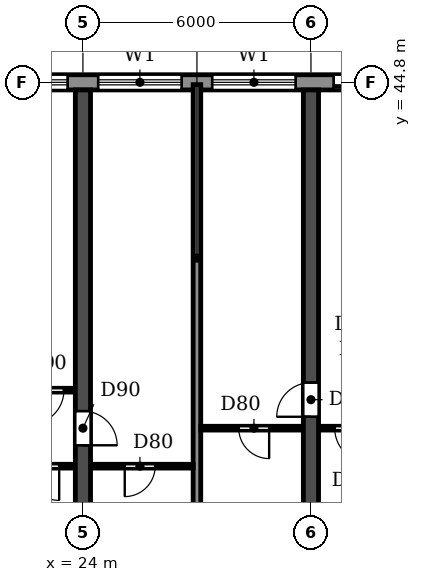
"""IFC4 building model, lengths in metres.
Left out: names, types, materials, properties, quantities, classifications, styles, units other than length and angle.
Written with IfcOpenShell. Run it as: python <this file> out.ifc"""

import sys

from ifc_helpers import new_model, si_unit, direction, frame, frame_2d, origin, place, context, subcontext, project, spatial, rectangle, extrude, element, fill, save


model = new_model("IFC4")
c1 = context("Model", 3, precision=1e-05, world=origin(), true_north=direction((0.0, 1.0)))
c2 = subcontext(c1, "Body", "Model", "MODEL_VIEW")
j1 = project(units=[si_unit("LENGTHUNIT", "METRE"), si_unit("PLANEANGLEUNIT", "RADIAN")], contexts=[c1])
p1 = place(None, origin())
s1 = spatial("IfcSite", under=j1, at=p1, CompositionType="ELEMENT")
p2 = place(p1, origin())
s2 = spatial("IfcBuilding", under=s1, at=p2, CompositionType="ELEMENT")
p3 = place(p2, frame((0.0, 0.0, 23.4)))
s3 = spatial("IfcBuildingStorey", under=s2, at=p3, CompositionType="ELEMENT", Elevation=23.4)
p4 = place(p3, frame((24.0, 30.55, 0.0), z_axis=(0.0, 0.0, 1.0), x_axis=(0.0, 1.0, 0.0)))
e1 = element("IfcWall", 1, at=p4, inside=s3, PredefinedType="SHEAR", context=c2, shape_type="SweptSolid", body=[
    extrude(rectangle(XDim=14.05, YDim=0.4, at=frame_2d((7.025, 0.0))), origin(), (0.0, 0.0, 1.0), 3.05),
])
p5 = place(p4, frame((4.7, 0.0, 0.0)))
e2 = element("IfcOpeningElement", 2, at=p5, cuts=e1, PredefinedType="OPENING", context=c2, shape_type="SweptSolid", body=[
    extrude(rectangle(XDim=0.9, YDim=2.1, at=frame_2d((0.45, 1.05))), frame((0.0, 0.21, 0.0), z_axis=(0.0, -1.0, 0.0), x_axis=(1.0, 0.0, 0.0)), (0.0, 0.0, 1.0), 0.42),
])
p6 = place(p3, frame((30.0, 30.55, 0.0), z_axis=(0.0, 0.0, 1.0), x_axis=(0.0, 1.0, 0.0)))
e3 = element("IfcWall", 3, at=p6, inside=s3, PredefinedType="SHEAR", context=c2, shape_type="SweptSolid", body=[
    extrude(rectangle(XDim=14.05, YDim=0.4, at=frame_2d((7.025, 0.0))), origin(), (0.0, 0.0, 1.0), 3.05),
])
p7 = place(p6, frame((5.45, 0.0, 0.0)))
e4 = element("IfcOpeningElement", 4, at=p7, cuts=e3, PredefinedType="OPENING", context=c2, shape_type="SweptSolid", body=[
    extrude(rectangle(XDim=0.9, YDim=2.1, at=frame_2d((0.45, 1.05))), frame((0.0, 0.21, 0.0), z_axis=(0.0, -1.0, 0.0), x_axis=(1.0, 0.0, 0.0)), (0.0, 0.0, 1.0), 0.42),
])
p8 = place(p3, frame((97.317, 44.8, 0.0), z_axis=(0.0, 0.0, 1.0), x_axis=(-1.0, 0.0, 0.0)))
e5 = element("IfcWall", 5, at=p8, inside=s3, PredefinedType="STANDARD", context=c2, shape_type="SweptSolid", body=[
    extrude(rectangle(XDim=92.634, YDim=0.4, at=frame_2d((46.317, 0.0))), origin(), (0.0, 0.0, 1.0), 3.05),
])
p9 = place(p8, frame((88.717, 0.0, 0.9)))
e6 = element("IfcOpeningElement", 6, at=p9, cuts=e5, PredefinedType="OPENING", context=c2, shape_type="SweptSolid", body=[
    extrude(rectangle(XDim=2.2, YDim=1.5, at=frame_2d((1.1, 0.75))), frame((0.0, 0.21, 0.0), z_axis=(0.0, -1.0, 0.0), x_axis=(1.0, 0.0, 0.0)), (0.0, 0.0, 1.0), 0.42),
])
p10 = place(p8, frame((85.917, 0.0, 0.0)))
e7 = element("IfcOpeningElement", 7, at=p10, cuts=e5, PredefinedType="OPENING", context=c2, shape_type="SweptSolid", body=[
    extrude(rectangle(XDim=1.8, YDim=2.4, at=frame_2d((0.9, 1.2))), frame((0.0, 0.21, 0.0), z_axis=(0.0, -1.0, 0.0), x_axis=(1.0, 0.0, 0.0)), (0.0, 0.0, 1.0), 0.42),
])
p11 = place(p8, frame((82.717, 0.0, 0.9)))
e8 = element("IfcOpeningElement", 8, at=p11, cuts=e5, PredefinedType="OPENING", context=c2, shape_type="SweptSolid", body=[
    extrude(rectangle(XDim=2.2, YDim=1.5, at=frame_2d((1.1, 0.75))), frame((0.0, 0.21, 0.0), z_axis=(0.0, -1.0, 0.0), x_axis=(1.0, 0.0, 0.0)), (0.0, 0.0, 1.0), 0.42),
])
p12 = place(p8, frame((79.717, 0.0, 0.9)))
e9 = element("IfcOpeningElement", 9, at=p12, cuts=e5, PredefinedType="OPENING", context=c2, shape_type="SweptSolid", body=[
    extrude(rectangle(XDim=2.2, YDim=1.5, at=frame_2d((1.1, 0.75))), frame((0.0, 0.21, 0.0), z_axis=(0.0, -1.0, 0.0), x_axis=(1.0, 0.0, 0.0)), (0.0, 0.0, 1.0), 0.42),
])
p13 = place(p8, frame((76.917, 0.0, 0.0)))
e10 = element("IfcOpeningElement", 10, at=p13, cuts=e5, PredefinedType="OPENING", context=c2, shape_type="SweptSolid", body=[
    extrude(rectangle(XDim=1.8, YDim=2.4, at=frame_2d((0.9, 1.2))), frame((0.0, 0.21, 0.0), z_axis=(0.0, -1.0, 0.0), x_axis=(1.0, 0.0, 0.0)), (0.0, 0.0, 1.0), 0.42),
])
p14 = place(p8, frame((73.717, 0.0, 0.9)))
e11 = element("IfcOpeningElement", 11, at=p14, cuts=e5, PredefinedType="OPENING", context=c2, shape_type="SweptSolid", body=[
    extrude(rectangle(XDim=2.2, YDim=1.5, at=frame_2d((1.1, 0.75))), frame((0.0, 0.21, 0.0), z_axis=(0.0, -1.0, 0.0), x_axis=(1.0, 0.0, 0.0)), (0.0, 0.0, 1.0), 0.42),
])
p15 = place(p8, frame((70.717, 0.0, 0.9)))
e12 = element("IfcOpeningElement", 12, at=p15, cuts=e5, PredefinedType="OPENING", context=c2, shape_type="SweptSolid", body=[
    extrude(rectangle(XDim=2.2, YDim=1.5, at=frame_2d((1.1, 0.75))), frame((0.0, 0.21, 0.0), z_axis=(0.0, -1.0, 0.0), x_axis=(1.0, 0.0, 0.0)), (0.0, 0.0, 1.0), 0.42),
])
p16 = place(p8, frame((67.717, 0.0, 0.9)))
e13 = element("IfcOpeningElement", 13, at=p16, cuts=e5, PredefinedType="OPENING", context=c2, shape_type="SweptSolid", body=[
    extrude(rectangle(XDim=2.2, YDim=1.5, at=frame_2d((1.1, 0.75))), frame((0.0, 0.21, 0.0), z_axis=(0.0, -1.0, 0.0), x_axis=(1.0, 0.0, 0.0)), (0.0, 0.0, 1.0), 0.42),
])
p17 = place(p8, frame((64.917, 0.0, 0.0)))
e14 = element("IfcOpeningElement", 14, at=p17, cuts=e5, PredefinedType="OPENING", context=c2, shape_type="SweptSolid", body=[
    extrude(rectangle(XDim=1.8, YDim=2.4, at=frame_2d((0.9, 1.2))), frame((0.0, 0.21, 0.0), z_axis=(0.0, -1.0, 0.0), x_axis=(1.0, 0.0, 0.0)), (0.0, 0.0, 1.0), 0.42),
])
p18 = place(p8, frame((61.717, 0.0, 0.9)))
e15 = element("IfcOpeningElement", 15, at=p18, cuts=e5, PredefinedType="OPENING", context=c2, shape_type="SweptSolid", body=[
    extrude(rectangle(XDim=2.2, YDim=1.5, at=frame_2d((1.1, 0.75))), frame((0.0, 0.21, 0.0), z_axis=(0.0, -1.0, 0.0), x_axis=(1.0, 0.0, 0.0)), (0.0, 0.0, 1.0), 0.42),
])
p19 = place(p8, frame((58.717, 0.0, 0.9)))
e16 = element("IfcOpeningElement", 16, at=p19, cuts=e5, PredefinedType="OPENING", context=c2, shape_type="SweptSolid", body=[
    extrude(rectangle(XDim=2.2, YDim=1.5, at=frame_2d((1.1, 0.75))), frame((0.0, 0.21, 0.0), z_axis=(0.0, -1.0, 0.0), x_axis=(1.0, 0.0, 0.0)), (0.0, 0.0, 1.0), 0.42),
])
p20 = place(p8, frame((55.917, 0.0, 0.0)))
e17 = element("IfcOpeningElement", 17, at=p20, cuts=e5, PredefinedType="OPENING", context=c2, shape_type="SweptSolid", body=[
    extrude(rectangle(XDim=1.8, YDim=2.4, at=frame_2d((0.9, 1.2))), frame((0.0, 0.21, 0.0), z_axis=(0.0, -1.0, 0.0), x_axis=(1.0, 0.0, 0.0)), (0.0, 0.0, 1.0), 0.42),
])
p21 = place(p8, frame((52.917, 0.0, 0.0)))
e18 = element("IfcOpeningElement", 18, at=p21, cuts=e5, PredefinedType="OPENING", context=c2, shape_type="SweptSolid", body=[
    extrude(rectangle(XDim=1.8, YDim=2.4, at=frame_2d((0.9, 1.2))), frame((0.0, 0.21, 0.0), z_axis=(0.0, -1.0, 0.0), x_axis=(1.0, 0.0, 0.0)), (0.0, 0.0, 1.0), 0.42),
])
p22 = place(p8, frame((49.717, 0.0, 0.9)))
e19 = element("IfcOpeningElement", 19, at=p22, cuts=e5, PredefinedType="OPENING", context=c2, shape_type="SweptSolid", body=[
    extrude(rectangle(XDim=2.2, YDim=1.5, at=frame_2d((1.1, 0.75))), frame((0.0, 0.21, 0.0), z_axis=(0.0, -1.0, 0.0), x_axis=(1.0, 0.0, 0.0)), (0.0, 0.0, 1.0), 0.42),
])
p23 = place(p8, frame((46.917, 0.0, 0.0)))
e20 = element("IfcOpeningElement", 20, at=p23, cuts=e5, PredefinedType="OPENING", context=c2, shape_type="SweptSolid", body=[
    extrude(rectangle(XDim=1.8, YDim=2.4, at=frame_2d((0.9, 1.2))), frame((0.0, 0.21, 0.0), z_axis=(0.0, -1.0, 0.0), x_axis=(1.0, 0.0, 0.0)), (0.0, 0.0, 1.0), 0.42),
])
p24 = place(p8, frame((43.717, 0.0, 0.9)))
e21 = element("IfcOpeningElement", 21, at=p24, cuts=e5, PredefinedType="OPENING", context=c2, shape_type="SweptSolid", body=[
    extrude(rectangle(XDim=2.2, YDim=1.5, at=frame_2d((1.1, 0.75))), frame((0.0, 0.21, 0.0), z_axis=(0.0, -1.0, 0.0), x_axis=(1.0, 0.0, 0.0)), (0.0, 0.0, 1.0), 0.42),
])
p25 = place(p8, frame((40.717, 0.0, 0.9)))
e22 = element("IfcOpeningElement", 22, at=p25, cuts=e5, PredefinedType="OPENING", context=c2, shape_type="SweptSolid", body=[
    extrude(rectangle(XDim=2.2, YDim=1.5, at=frame_2d((1.1, 0.75))), frame((0.0, 0.21, 0.0), z_axis=(0.0, -1.0, 0.0), x_axis=(1.0, 0.0, 0.0)), (0.0, 0.0, 1.0), 0.42),
])
p26 = place(p8, frame((37.917, 0.0, 0.0)))
e23 = element("IfcOpeningElement", 23, at=p26, cuts=e5, PredefinedType="OPENING", context=c2, shape_type="SweptSolid", body=[
    extrude(rectangle(XDim=1.8, YDim=2.4, at=frame_2d((0.9, 1.2))), frame((0.0, 0.21, 0.0), z_axis=(0.0, -1.0, 0.0), x_axis=(1.0, 0.0, 0.0)), (0.0, 0.0, 1.0), 0.42),
])
p27 = place(p8, frame((34.917, 0.0, 0.0)))
e24 = element("IfcOpeningElement", 24, at=p27, cuts=e5, PredefinedType="OPENING", context=c2, shape_type="SweptSolid", body=[
    extrude(rectangle(XDim=1.8, YDim=2.4, at=frame_2d((0.9, 1.2))), frame((0.0, 0.21, 0.0), z_axis=(0.0, -1.0, 0.0), x_axis=(1.0, 0.0, 0.0)), (0.0, 0.0, 1.0), 0.42),
])
p28 = place(p8, frame((31.717, 0.0, 0.9)))
e25 = element("IfcOpeningElement", 25, at=p28, cuts=e5, PredefinedType="OPENING", context=c2, shape_type="SweptSolid", body=[
    extrude(rectangle(XDim=2.2, YDim=1.5, at=frame_2d((1.1, 0.75))), frame((0.0, 0.21, 0.0), z_axis=(0.0, -1.0, 0.0), x_axis=(1.0, 0.0, 0.0)), (0.0, 0.0, 1.0), 0.42),
])
p29 = place(p8, frame((28.717, 0.0, 0.9)))
e26 = element("IfcOpeningElement", 26, at=p29, cuts=e5, PredefinedType="OPENING", context=c2, shape_type="SweptSolid", body=[
    extrude(rectangle(XDim=2.2, YDim=1.5, at=frame_2d((1.1, 0.75))), frame((0.0, 0.21, 0.0), z_axis=(0.0, -1.0, 0.0), x_axis=(1.0, 0.0, 0.0)), (0.0, 0.0, 1.0), 0.42),
])
p30 = place(p8, frame((25.717, 0.0, 0.9)))
e27 = element("IfcOpeningElement", 27, at=p30, cuts=e5, PredefinedType="OPENING", context=c2, shape_type="SweptSolid", body=[
    extrude(rectangle(XDim=2.2, YDim=1.5, at=frame_2d((1.1, 0.75))), frame((0.0, 0.21, 0.0), z_axis=(0.0, -1.0, 0.0), x_axis=(1.0, 0.0, 0.0)), (0.0, 0.0, 1.0), 0.42),
])
p31 = place(p8, frame((22.717, 0.0, 0.9)))
e28 = element("IfcOpeningElement", 28, at=p31, cuts=e5, PredefinedType="OPENING", context=c2, shape_type="SweptSolid", body=[
    extrude(rectangle(XDim=2.2, YDim=1.5, at=frame_2d((1.1, 0.75))), frame((0.0, 0.21, 0.0), z_axis=(0.0, -1.0, 0.0), x_axis=(1.0, 0.0, 0.0)), (0.0, 0.0, 1.0), 0.42),
])
p32 = place(p8, frame((19.917, 0.0, 0.0)))
e29 = element("IfcOpeningElement", 29, at=p32, cuts=e5, PredefinedType="OPENING", context=c2, shape_type="SweptSolid", body=[
    extrude(rectangle(XDim=1.8, YDim=2.4, at=frame_2d((0.9, 1.2))), frame((0.0, 0.21, 0.0), z_axis=(0.0, -1.0, 0.0), x_axis=(1.0, 0.0, 0.0)), (0.0, 0.0, 1.0), 0.42),
])
p33 = place(p8, frame((16.717, 0.0, 0.9)))
e30 = element("IfcOpeningElement", 30, at=p33, cuts=e5, PredefinedType="OPENING", context=c2, shape_type="SweptSolid", body=[
    extrude(rectangle(XDim=2.2, YDim=1.5, at=frame_2d((1.1, 0.75))), frame((0.0, 0.21, 0.0), z_axis=(0.0, -1.0, 0.0), x_axis=(1.0, 0.0, 0.0)), (0.0, 0.0, 1.0), 0.42),
])
p34 = place(p8, frame((13.717, 0.0, 0.9)))
e31 = element("IfcOpeningElement", 31, at=p34, cuts=e5, PredefinedType="OPENING", context=c2, shape_type="SweptSolid", body=[
    extrude(rectangle(XDim=2.2, YDim=1.5, at=frame_2d((1.1, 0.75))), frame((0.0, 0.21, 0.0), z_axis=(0.0, -1.0, 0.0), x_axis=(1.0, 0.0, 0.0)), (0.0, 0.0, 1.0), 0.42),
])
p35 = place(p8, frame((10.717, 0.0, 0.9)))
e32 = element("IfcOpeningElement", 32, at=p35, cuts=e5, PredefinedType="OPENING", context=c2, shape_type="SweptSolid", body=[
    extrude(rectangle(XDim=2.2, YDim=1.5, at=frame_2d((1.1, 0.75))), frame((0.0, 0.21, 0.0), z_axis=(0.0, -1.0, 0.0), x_axis=(1.0, 0.0, 0.0)), (0.0, 0.0, 1.0), 0.42),
])
p36 = place(p8, frame((7.917, 0.0, 0.0)))
e33 = element("IfcOpeningElement", 33, at=p36, cuts=e5, PredefinedType="OPENING", context=c2, shape_type="SweptSolid", body=[
    extrude(rectangle(XDim=1.8, YDim=2.4, at=frame_2d((0.9, 1.2))), frame((0.0, 0.21, 0.0), z_axis=(0.0, -1.0, 0.0), x_axis=(1.0, 0.0, 0.0)), (0.0, 0.0, 1.0), 0.42),
])
p37 = place(p8, frame((4.917, 0.0, 0.0)))
e34 = element("IfcOpeningElement", 34, at=p37, cuts=e5, PredefinedType="OPENING", context=c2, shape_type="SweptSolid", body=[
    extrude(rectangle(XDim=1.8, YDim=2.4, at=frame_2d((0.9, 1.2))), frame((0.0, 0.21, 0.0), z_axis=(0.0, -1.0, 0.0), x_axis=(1.0, 0.0, 0.0)), (0.0, 0.0, 1.0), 0.42),
])
p38 = place(p8, frame((1.717, 0.0, 0.9)))
e35 = element("IfcOpeningElement", 35, at=p38, cuts=e5, PredefinedType="OPENING", context=c2, shape_type="SweptSolid", body=[
    extrude(rectangle(XDim=2.2, YDim=1.5, at=frame_2d((1.1, 0.75))), frame((0.0, 0.21, 0.0), z_axis=(0.0, -1.0, 0.0), x_axis=(1.0, 0.0, 0.0)), (0.0, 0.0, 1.0), 0.42),
])
p39 = place(p3, frame((27.0, 30.56, 0.0), z_axis=(0.0, 0.0, 1.0), x_axis=(0.0, 1.0, 0.0)))
e36 = element("IfcWall", 36, at=p39, inside=s3, PredefinedType="PARTITIONING", context=c2, shape_type="SweptSolid", body=[
    extrude(rectangle(XDim=14.18, YDim=0.2, at=frame_2d((7.09, 0.0))), origin(), (0.0, 0.0, 1.0), 3.05),
])
p40 = place(p3, frame((21.8, 34.7, 0.0), z_axis=(0.0, 0.0, 1.0), x_axis=(1.0, 0.0, 0.0)))
e37 = element("IfcWall", 37, at=p40, inside=s3, PredefinedType="PARTITIONING", context=c2, shape_type="SweptSolid", body=[
    extrude(rectangle(XDim=1.99, YDim=0.1, at=frame_2d((0.995, 0.0))), origin(), (0.0, 0.0, 1.0), 3.05),
])
p41 = place(p40, frame((0.675, 0.0, 0.0)))
e38 = element("IfcOpeningElement", 38, at=p41, cuts=e37, PredefinedType="OPENING", context=c2, shape_type="SweptSolid", body=[
    extrude(rectangle(XDim=0.9, YDim=2.1, at=frame_2d((0.45, 1.05))), frame((0.0, 0.06, 0.0), z_axis=(0.0, -1.0, 0.0), x_axis=(1.0, 0.0, 0.0)), (0.0, 0.0, 1.0), 0.12),
])
p42 = place(p3, frame((24.21, 34.7, 0.0), z_axis=(0.0, 0.0, 1.0), x_axis=(1.0, 0.0, 0.0)))
e39 = element("IfcWall", 39, at=p42, inside=s3, PredefinedType="PARTITIONING", context=c2, shape_type="SweptSolid", body=[
    extrude(rectangle(XDim=2.69, YDim=0.1, at=frame_2d((1.345, 0.0))), origin(), (0.0, 0.0, 1.0), 3.05),
])
p43 = place(p42, frame((0.89, 0.0, 0.0)))
e40 = element("IfcOpeningElement", 40, at=p43, cuts=e39, PredefinedType="OPENING", context=c2, shape_type="SweptSolid", body=[
    extrude(rectangle(XDim=0.8, YDim=2.1, at=frame_2d((0.4, 1.05))), frame((0.0, 0.06, 0.0), z_axis=(0.0, -1.0, 0.0), x_axis=(1.0, 0.0, 0.0)), (0.0, 0.0, 1.0), 0.12),
])
p44 = place(p3, frame((27.1, 35.7, 0.0), z_axis=(0.0, 0.0, 1.0), x_axis=(1.0, 0.0, 0.0)))
e41 = element("IfcWall", 41, at=p44, inside=s3, PredefinedType="PARTITIONING", context=c2, shape_type="SweptSolid", body=[
    extrude(rectangle(XDim=2.69, YDim=0.1, at=frame_2d((1.345, 0.0))), origin(), (0.0, 0.0, 1.0), 3.05),
])
p45 = place(p44, frame((1.0, 0.0, 0.0)))
e42 = element("IfcOpeningElement", 42, at=p45, cuts=e41, PredefinedType="OPENING", context=c2, shape_type="SweptSolid", body=[
    extrude(rectangle(XDim=0.8, YDim=2.1, at=frame_2d((0.4, 1.05))), frame((0.0, 0.06, 0.0), z_axis=(0.0, -1.0, 0.0), x_axis=(1.0, 0.0, 0.0)), (0.0, 0.0, 1.0), 0.12),
])
p46 = place(p3, frame((30.21, 35.7, 0.0), z_axis=(0.0, 0.0, 1.0), x_axis=(1.0, 0.0, 0.0)))
e43 = element("IfcWall", 43, at=p46, inside=s3, PredefinedType="PARTITIONING", context=c2, shape_type="SweptSolid", body=[
    extrude(rectangle(XDim=1.99, YDim=0.1, at=frame_2d((0.995, 0.0))), origin(), (0.0, 0.0, 1.0), 3.05),
])
p47 = place(p46, frame((0.415, 0.0, 0.0)))
e44 = element("IfcOpeningElement", 44, at=p47, cuts=e43, PredefinedType="OPENING", context=c2, shape_type="SweptSolid", body=[
    extrude(rectangle(XDim=0.9, YDim=2.1, at=frame_2d((0.45, 1.05))), frame((0.0, 0.06, 0.0), z_axis=(0.0, -1.0, 0.0), x_axis=(1.0, 0.0, 0.0)), (0.0, 0.0, 1.0), 0.12),
])
p48 = place(p3, frame((20.95, 36.7, 0.0), z_axis=(0.0, 0.0, 1.0), x_axis=(1.0, 0.0, 0.0)))
e45 = element("IfcWall", 45, at=p48, inside=s3, PredefinedType="PARTITIONING", context=c2, shape_type="SweptSolid", body=[
    extrude(rectangle(XDim=2.84, YDim=0.1, at=frame_2d((1.42, 0.0))), origin(), (0.0, 0.0, 1.0), 3.05),
])
p49 = place(p48, frame((1.65, 0.0, 0.0)))
e46 = element("IfcOpeningElement", 46, at=p49, cuts=e45, PredefinedType="OPENING", context=c2, shape_type="SweptSolid", body=[
    extrude(rectangle(XDim=0.9, YDim=2.1, at=frame_2d((0.45, 1.05))), frame((0.0, 0.06, 0.0), z_axis=(0.0, -1.0, 0.0), x_axis=(1.0, 0.0, 0.0)), (0.0, 0.0, 1.0), 0.12),
])
p50 = place(p14, origin())
e47 = element("IfcWindow", 47, at=p50, inside=s3, PartitioningType="DOUBLE_PANEL_HORIZONTAL", PredefinedType="WINDOW", context=c2, shape_type="SweptSolid", body=[
    extrude(rectangle(XDim=2.2, YDim=1.5, at=frame_2d((1.1, 0.75))), frame((0.0, 0.03, 0.0), z_axis=(0.0, -1.0, 0.0), x_axis=(1.0, 0.0, 0.0)), (0.0, 0.0, 1.0), 0.06),
])
fill(e11, e47)
p51 = place(p15, origin())
e48 = element("IfcWindow", 48, at=p51, inside=s3, PartitioningType="DOUBLE_PANEL_HORIZONTAL", PredefinedType="WINDOW", context=c2, shape_type="SweptSolid", body=[
    extrude(rectangle(XDim=2.2, YDim=1.5, at=frame_2d((1.1, 0.75))), frame((0.0, 0.03, 0.0), z_axis=(0.0, -1.0, 0.0), x_axis=(1.0, 0.0, 0.0)), (0.0, 0.0, 1.0), 0.06),
])
fill(e12, e48)
p52 = place(p16, origin())
e49 = element("IfcWindow", 49, at=p52, inside=s3, PartitioningType="DOUBLE_PANEL_HORIZONTAL", PredefinedType="WINDOW", context=c2, shape_type="SweptSolid", body=[
    extrude(rectangle(XDim=2.2, YDim=1.5, at=frame_2d((1.1, 0.75))), frame((0.0, 0.03, 0.0), z_axis=(0.0, -1.0, 0.0), x_axis=(1.0, 0.0, 0.0)), (0.0, 0.0, 1.0), 0.06),
])
fill(e13, e49)
p53 = place(p17, origin())
e50 = element("IfcDoor", 50, at=p53, inside=s3, OperationType="DOUBLE_DOOR_SLIDING", PredefinedType="DOOR", context=c2, shape_type="SweptSolid", body=[
    extrude(rectangle(XDim=1.8, YDim=2.4, at=frame_2d((0.9, 1.2))), frame((0.0, 0.025, 0.0), z_axis=(0.0, -1.0, 0.0), x_axis=(1.0, 0.0, 0.0)), (0.0, 0.0, 1.0), 0.05),
])
fill(e14, e50)
p54 = place(p43, frame((0.8, 0.0, 0.0), z_axis=(0.0, 0.0, 1.0), x_axis=(-1.0, 0.0, 0.0)))
e51 = element("IfcDoor", 51, at=p54, inside=s3, OperationType="SINGLE_SWING_RIGHT", PredefinedType="DOOR", context=c2, shape_type="SweptSolid", body=[
    extrude(rectangle(XDim=0.8, YDim=2.1, at=frame_2d((0.4, 1.05))), frame((0.0, 0.025, 0.0), z_axis=(0.0, -1.0, 0.0), x_axis=(1.0, 0.0, 0.0)), (0.0, 0.0, 1.0), 0.05),
])
fill(e40, e51)
p55 = place(p41, frame((0.9, 0.0, 0.0), z_axis=(0.0, 0.0, 1.0), x_axis=(-1.0, 0.0, 0.0)))
e52 = element("IfcDoor", 52, at=p55, inside=s3, OperationType="SINGLE_SWING_LEFT", PredefinedType="DOOR", context=c2, shape_type="SweptSolid", body=[
    extrude(rectangle(XDim=0.9, YDim=2.1, at=frame_2d((0.45, 1.05))), frame((0.0, 0.025, 0.0), z_axis=(0.0, -1.0, 0.0), x_axis=(1.0, 0.0, 0.0)), (0.0, 0.0, 1.0), 0.05),
])
fill(e38, e52)
p56 = place(p49, frame((0.9, 0.0, 0.0), z_axis=(0.0, 0.0, 1.0), x_axis=(-1.0, 0.0, 0.0)))
e53 = element("IfcDoor", 53, at=p56, inside=s3, OperationType="SINGLE_SWING_RIGHT", PredefinedType="DOOR", context=c2, shape_type="SweptSolid", body=[
    extrude(rectangle(XDim=0.9, YDim=2.1, at=frame_2d((0.45, 1.05))), frame((0.0, 0.025, 0.0), z_axis=(0.0, -1.0, 0.0), x_axis=(1.0, 0.0, 0.0)), (0.0, 0.0, 1.0), 0.05),
])
fill(e46, e53)
p57 = place(p5, frame((0.9, 0.0, 0.0), z_axis=(0.0, 0.0, 1.0), x_axis=(-1.0, 0.0, 0.0)))
e54 = element("IfcDoor", 54, at=p57, inside=s3, OperationType="SINGLE_SWING_RIGHT", PredefinedType="DOOR", context=c2, shape_type="SweptSolid", body=[
    extrude(rectangle(XDim=0.9, YDim=2.1, at=frame_2d((0.45, 1.05))), frame((0.0, 0.025, 0.0), z_axis=(0.0, -1.0, 0.0), x_axis=(1.0, 0.0, 0.0)), (0.0, 0.0, 1.0), 0.05),
])
fill(e2, e54)
p58 = place(p45, frame((0.8, 0.0, 0.0), z_axis=(0.0, 0.0, 1.0), x_axis=(-1.0, 0.0, 0.0)))
e55 = element("IfcDoor", 55, at=p58, inside=s3, OperationType="SINGLE_SWING_LEFT", PredefinedType="DOOR", context=c2, shape_type="SweptSolid", body=[
    extrude(rectangle(XDim=0.8, YDim=2.1, at=frame_2d((0.4, 1.05))), frame((0.0, 0.025, 0.0), z_axis=(0.0, -1.0, 0.0), x_axis=(1.0, 0.0, 0.0)), (0.0, 0.0, 1.0), 0.05),
])
fill(e42, e55)
p59 = place(p7, origin())
e56 = element("IfcDoor", 56, at=p59, inside=s3, OperationType="SINGLE_SWING_LEFT", PredefinedType="DOOR", context=c2, shape_type="SweptSolid", body=[
    extrude(rectangle(XDim=0.9, YDim=2.1, at=frame_2d((0.45, 1.05))), frame((0.0, 0.025, 0.0), z_axis=(0.0, -1.0, 0.0), x_axis=(1.0, 0.0, 0.0)), (0.0, 0.0, 1.0), 0.05),
])
fill(e4, e56)
p60 = place(p47, frame((0.9, 0.0, 0.0), z_axis=(0.0, 0.0, 1.0), x_axis=(-1.0, 0.0, 0.0)))
e57 = element("IfcDoor", 57, at=p60, inside=s3, OperationType="SINGLE_SWING_LEFT", PredefinedType="DOOR", context=c2, shape_type="SweptSolid", body=[
    extrude(rectangle(XDim=0.9, YDim=2.1, at=frame_2d((0.45, 1.05))), frame((0.0, 0.025, 0.0), z_axis=(0.0, -1.0, 0.0), x_axis=(1.0, 0.0, 0.0)), (0.0, 0.0, 1.0), 0.05),
])
fill(e44, e57)
save(model, sys.argv[1])
